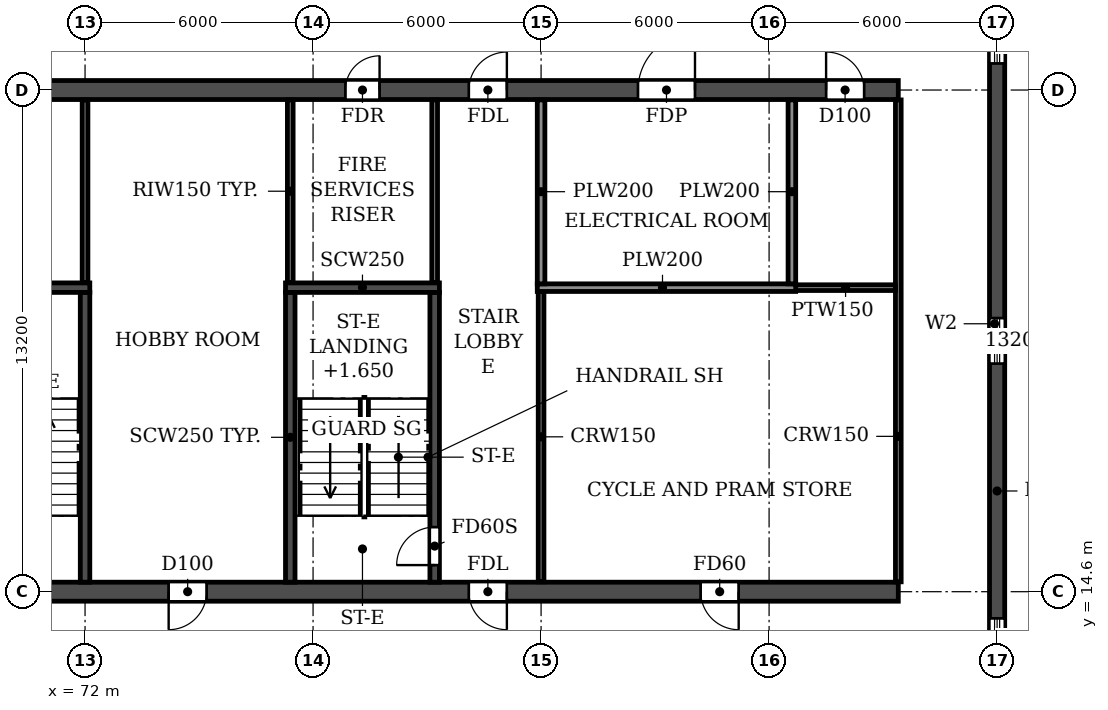
"""IFC4 building model, lengths in metres.
Left out: names, types, materials, properties, quantities, classifications, styles, units other than length and angle.
Written with IfcOpenShell. Run it as: python <this file> out.ifc"""

import sys

from ifc_helpers import new_model, si_unit, direction, frame, frame_2d, origin, place, context, subcontext, project, spatial, rectangle, extrude, element, fill, save


model = new_model("IFC4")
c1 = context("Model", 3, precision=1e-05, world=origin(), true_north=direction((0.0, 1.0)))
c2 = subcontext(c1, "Body", "Model", "MODEL_VIEW")
j1 = project(units=[si_unit("LENGTHUNIT", "METRE"), si_unit("PLANEANGLEUNIT", "RADIAN")], contexts=[c1])
p1 = place(None, origin())
s1 = spatial("IfcSite", under=j1, at=p1, CompositionType="ELEMENT")
p2 = place(p1, origin())
s2 = spatial("IfcBuilding", under=s1, at=p2, CompositionType="ELEMENT")
p3 = place(p2, frame((0.0, 0.0, 102.6)))
s3 = spatial("IfcBuildingStorey", under=s2, at=p3, CompositionType="ELEMENT", Elevation=102.6)
p4 = place(p3, frame((96.0, 4.683, 0.0), z_axis=(0.0, 0.0, 1.0), x_axis=(0.0, 1.0, 0.0)))
e1 = element("IfcWall", 1, at=p4, inside=s3, PredefinedType="SHEAR", context=c2, shape_type="SweptSolid", body=[
    extrude(rectangle(XDim=34.234, YDim=0.4, at=frame_2d((17.117, 0.0))), origin(), (0.0, 0.0, 1.0), 3.0),
])
p5 = place(p4, frame((15.917, 0.0, 0.9)))
e2 = element("IfcOpeningElement", 2, at=p5, cuts=e1, PredefinedType="OPENING", context=c2, shape_type="SweptSolid", body=[
    extrude(rectangle(XDim=1.2, YDim=1.5, at=frame_2d((0.6, 0.75))), frame((0.0, 0.21, 0.0), z_axis=(0.0, -1.0, 0.0), x_axis=(1.0, 0.0, 0.0)), (0.0, 0.0, 1.0), 0.42),
])
p6 = place(p4, frame((23.817, 0.0, 0.9)))
e3 = element("IfcOpeningElement", 3, at=p6, cuts=e1, PredefinedType="OPENING", context=c2, shape_type="SweptSolid", body=[
    extrude(rectangle(XDim=1.2, YDim=1.5, at=frame_2d((0.6, 0.75))), frame((0.0, 0.21, 0.0), z_axis=(0.0, -1.0, 0.0), x_axis=(1.0, 0.0, 0.0)), (0.0, 0.0, 1.0), 0.42),
])
p7 = place(p4, frame((8.017, 0.0, 0.9)))
e4 = element("IfcOpeningElement", 4, at=p7, cuts=e1, PredefinedType="OPENING", context=c2, shape_type="SweptSolid", body=[
    extrude(rectangle(XDim=1.2, YDim=1.5, at=frame_2d((0.6, 0.75))), frame((0.0, 0.21, 0.0), z_axis=(0.0, -1.0, 0.0), x_axis=(1.0, 0.0, 0.0)), (0.0, 0.0, 1.0), 0.42),
])
p8 = place(p4, frame((28.894, 0.0, 0.6)))
e5 = element("IfcOpeningElement", 5, at=p8, cuts=e1, PredefinedType="OPENING", context=c2, shape_type="SweptSolid", body=[
    extrude(rectangle(XDim=2.2, YDim=1.8, at=frame_2d((1.1, 0.9))), frame((0.0, 0.21, 0.0), z_axis=(0.0, -1.0, 0.0), x_axis=(1.0, 0.0, 0.0)), (0.0, 0.0, 1.0), 0.42),
])
p9 = place(p4, frame((2.541, 0.0, 0.6)))
e6 = element("IfcOpeningElement", 6, at=p9, cuts=e1, PredefinedType="OPENING", context=c2, shape_type="SweptSolid", body=[
    extrude(rectangle(XDim=2.2, YDim=1.8, at=frame_2d((1.1, 0.9))), frame((0.0, 0.21, 0.0), z_axis=(0.0, -1.0, 0.0), x_axis=(1.0, 0.0, 0.0)), (0.0, 0.0, 1.0), 0.42),
])
p10 = place(p3, frame((8.6, 14.6, 0.0), z_axis=(0.0, 0.0, 1.0), x_axis=(1.0, 0.0, 0.0)))
e7 = element("IfcWall", 7, at=p10, inside=s3, PredefinedType="SOLIDWALL", context=c2, shape_type="SweptSolid", body=[
    extrude(rectangle(XDim=84.8, YDim=0.5, at=frame_2d((42.4, 0.0))), origin(), (0.0, 0.0, 1.0), 3.0),
])
p11 = place(p10, frame((0.9, 0.0, 0.0)))
e8 = element("IfcOpeningElement", 8, at=p11, cuts=e7, PredefinedType="OPENING", context=c2, shape_type="SweptSolid", body=[
    extrude(rectangle(XDim=1.0, YDim=2.1, at=frame_2d((0.5, 1.05))), frame((0.0, 0.26, 0.0), z_axis=(0.0, -1.0, 0.0), x_axis=(1.0, 0.0, 0.0)), (0.0, 0.0, 1.0), 0.52),
])
p12 = place(p10, frame((5.6, 0.0, 0.0)))
e9 = element("IfcOpeningElement", 9, at=p12, cuts=e7, PredefinedType="OPENING", context=c2, shape_type="SweptSolid", body=[
    extrude(rectangle(XDim=1.0, YDim=2.1, at=frame_2d((0.5, 1.05))), frame((0.0, 0.26, 0.0), z_axis=(0.0, -1.0, 0.0), x_axis=(1.0, 0.0, 0.0)), (0.0, 0.0, 1.0), 0.52),
])
p13 = place(p10, frame((10.3, 0.0, 0.0)))
e10 = element("IfcOpeningElement", 10, at=p13, cuts=e7, PredefinedType="OPENING", context=c2, shape_type="SweptSolid", body=[
    extrude(rectangle(XDim=1.0, YDim=2.1, at=frame_2d((0.5, 1.05))), frame((0.0, 0.26, 0.0), z_axis=(0.0, -1.0, 0.0), x_axis=(1.0, 0.0, 0.0)), (0.0, 0.0, 1.0), 0.52),
])
p14 = place(p10, frame((18.2, 0.0, 0.0)))
e11 = element("IfcOpeningElement", 11, at=p14, cuts=e7, PredefinedType="OPENING", context=c2, shape_type="SweptSolid", body=[
    extrude(rectangle(XDim=1.0, YDim=2.1, at=frame_2d((0.5, 1.05))), frame((0.0, 0.26, 0.0), z_axis=(0.0, -1.0, 0.0), x_axis=(1.0, 0.0, 0.0)), (0.0, 0.0, 1.0), 0.52),
])
p15 = place(p10, frame((22.8, 0.0, 0.0)))
e12 = element("IfcOpeningElement", 12, at=p15, cuts=e7, PredefinedType="OPENING", context=c2, shape_type="SweptSolid", body=[
    extrude(rectangle(XDim=1.0, YDim=2.1, at=frame_2d((0.5, 1.05))), frame((0.0, 0.26, 0.0), z_axis=(0.0, -1.0, 0.0), x_axis=(1.0, 0.0, 0.0)), (0.0, 0.0, 1.0), 0.52),
])
p16 = place(p10, frame((36.7, 0.0, 0.0)))
e13 = element("IfcOpeningElement", 13, at=p16, cuts=e7, PredefinedType="OPENING", context=c2, shape_type="SweptSolid", body=[
    extrude(rectangle(XDim=1.0, YDim=2.1, at=frame_2d((0.5, 1.05))), frame((0.0, 0.26, 0.0), z_axis=(0.0, -1.0, 0.0), x_axis=(1.0, 0.0, 0.0)), (0.0, 0.0, 1.0), 0.52),
])
p17 = place(p10, frame((41.9, 0.0, 0.0)))
e14 = element("IfcOpeningElement", 14, at=p17, cuts=e7, PredefinedType="OPENING", context=c2, shape_type="SweptSolid", body=[
    extrude(rectangle(XDim=1.0, YDim=2.1, at=frame_2d((0.5, 1.05))), frame((0.0, 0.26, 0.0), z_axis=(0.0, -1.0, 0.0), x_axis=(1.0, 0.0, 0.0)), (0.0, 0.0, 1.0), 0.52),
])
p18 = place(p10, frame((47.1, 0.0, 0.0)))
e15 = element("IfcOpeningElement", 15, at=p18, cuts=e7, PredefinedType="OPENING", context=c2, shape_type="SweptSolid", body=[
    extrude(rectangle(XDim=1.0, YDim=2.1, at=frame_2d((0.5, 1.05))), frame((0.0, 0.26, 0.0), z_axis=(0.0, -1.0, 0.0), x_axis=(1.0, 0.0, 0.0)), (0.0, 0.0, 1.0), 0.52),
])
p19 = place(p10, frame((61.0, 0.0, 0.0)))
e16 = element("IfcOpeningElement", 16, at=p19, cuts=e7, PredefinedType="OPENING", context=c2, shape_type="SweptSolid", body=[
    extrude(rectangle(XDim=1.0, YDim=2.1, at=frame_2d((0.5, 1.05))), frame((0.0, 0.26, 0.0), z_axis=(0.0, -1.0, 0.0), x_axis=(1.0, 0.0, 0.0)), (0.0, 0.0, 1.0), 0.52),
])
p20 = place(p10, frame((65.6, 0.0, 0.0)))
e17 = element("IfcOpeningElement", 17, at=p20, cuts=e7, PredefinedType="OPENING", context=c2, shape_type="SweptSolid", body=[
    extrude(rectangle(XDim=1.0, YDim=2.1, at=frame_2d((0.5, 1.05))), frame((0.0, 0.26, 0.0), z_axis=(0.0, -1.0, 0.0), x_axis=(1.0, 0.0, 0.0)), (0.0, 0.0, 1.0), 0.52),
])
p21 = place(p10, frame((73.5, 0.0, 0.0)))
e18 = element("IfcOpeningElement", 18, at=p21, cuts=e7, PredefinedType="OPENING", context=c2, shape_type="SweptSolid", body=[
    extrude(rectangle(XDim=1.0, YDim=2.1, at=frame_2d((0.5, 1.05))), frame((0.0, 0.26, 0.0), z_axis=(0.0, -1.0, 0.0), x_axis=(1.0, 0.0, 0.0)), (0.0, 0.0, 1.0), 0.52),
])
p22 = place(p10, frame((79.6, 0.0, 0.0)))
e19 = element("IfcOpeningElement", 19, at=p22, cuts=e7, PredefinedType="OPENING", context=c2, shape_type="SweptSolid", body=[
    extrude(rectangle(XDim=1.0, YDim=2.1, at=frame_2d((0.5, 1.05))), frame((0.0, 0.26, 0.0), z_axis=(0.0, -1.0, 0.0), x_axis=(1.0, 0.0, 0.0)), (0.0, 0.0, 1.0), 0.52),
])
p23 = place(p3, frame((8.6, 27.8, 0.0), z_axis=(0.0, 0.0, 1.0), x_axis=(1.0, 0.0, 0.0)))
e20 = element("IfcWall", 20, at=p23, inside=s3, PredefinedType="SOLIDWALL", context=c2, shape_type="SweptSolid", body=[
    extrude(rectangle(XDim=84.8, YDim=0.5, at=frame_2d((42.4, 0.0))), origin(), (0.0, 0.0, 1.0), 3.0),
])
p24 = place(p23, frame((1.35, 0.0, 0.0)))
e21 = element("IfcOpeningElement", 21, at=p24, cuts=e20, PredefinedType="OPENING", context=c2, shape_type="SweptSolid", body=[
    extrude(rectangle(XDim=1.0, YDim=2.1, at=frame_2d((0.5, 1.05))), frame((0.0, 0.26, 0.0), z_axis=(0.0, -1.0, 0.0), x_axis=(1.0, 0.0, 0.0)), (0.0, 0.0, 1.0), 0.52),
])
p25 = place(p23, frame((6.05, 0.0, 0.0)))
e22 = element("IfcOpeningElement", 22, at=p25, cuts=e20, PredefinedType="OPENING", context=c2, shape_type="SweptSolid", body=[
    extrude(rectangle(XDim=1.0, YDim=2.1, at=frame_2d((0.5, 1.05))), frame((0.0, 0.26, 0.0), z_axis=(0.0, -1.0, 0.0), x_axis=(1.0, 0.0, 0.0)), (0.0, 0.0, 1.0), 0.52),
])
p26 = place(p23, frame((10.3, 0.0, 0.0)))
e23 = element("IfcOpeningElement", 23, at=p26, cuts=e20, PredefinedType="OPENING", context=c2, shape_type="SweptSolid", body=[
    extrude(rectangle(XDim=1.0, YDim=2.1, at=frame_2d((0.5, 1.05))), frame((0.0, 0.26, 0.0), z_axis=(0.0, -1.0, 0.0), x_axis=(1.0, 0.0, 0.0)), (0.0, 0.0, 1.0), 0.52),
])
p27 = place(p23, frame((13.65, 0.0, 0.0)))
e24 = element("IfcOpeningElement", 24, at=p27, cuts=e20, PredefinedType="OPENING", context=c2, shape_type="SweptSolid", body=[
    extrude(rectangle(XDim=0.9, YDim=2.1, at=frame_2d((0.45, 1.05))), frame((0.0, 0.26, 0.0), z_axis=(0.0, -1.0, 0.0), x_axis=(1.0, 0.0, 0.0)), (0.0, 0.0, 1.0), 0.52),
])
p28 = place(p23, frame((22.85, 0.0, 0.0)))
e25 = element("IfcOpeningElement", 25, at=p28, cuts=e20, PredefinedType="OPENING", context=c2, shape_type="SweptSolid", body=[
    extrude(rectangle(XDim=0.9, YDim=2.1, at=frame_2d((0.45, 1.05))), frame((0.0, 0.26, 0.0), z_axis=(0.0, -1.0, 0.0), x_axis=(1.0, 0.0, 0.0)), (0.0, 0.0, 1.0), 0.52),
])
p29 = place(p23, frame((28.6, 0.0, 0.0)))
e26 = element("IfcOpeningElement", 26, at=p29, cuts=e20, PredefinedType="OPENING", context=c2, shape_type="SweptSolid", body=[
    extrude(rectangle(XDim=1.0, YDim=2.1, at=frame_2d((0.5, 1.05))), frame((0.0, 0.26, 0.0), z_axis=(0.0, -1.0, 0.0), x_axis=(1.0, 0.0, 0.0)), (0.0, 0.0, 1.0), 0.52),
])
p30 = place(p23, frame((33.8, 0.0, 0.0)))
e27 = element("IfcOpeningElement", 27, at=p30, cuts=e20, PredefinedType="OPENING", context=c2, shape_type="SweptSolid", body=[
    extrude(rectangle(XDim=1.0, YDim=2.1, at=frame_2d((0.5, 1.05))), frame((0.0, 0.26, 0.0), z_axis=(0.0, -1.0, 0.0), x_axis=(1.0, 0.0, 0.0)), (0.0, 0.0, 1.0), 0.52),
])
p31 = place(p23, frame((39.0, 0.0, 0.0)))
e28 = element("IfcOpeningElement", 28, at=p31, cuts=e20, PredefinedType="OPENING", context=c2, shape_type="SweptSolid", body=[
    extrude(rectangle(XDim=1.0, YDim=2.1, at=frame_2d((0.5, 1.05))), frame((0.0, 0.26, 0.0), z_axis=(0.0, -1.0, 0.0), x_axis=(1.0, 0.0, 0.0)), (0.0, 0.0, 1.0), 0.52),
])
p32 = place(p23, frame((41.9, 0.0, 0.0)))
e29 = element("IfcOpeningElement", 29, at=p32, cuts=e20, PredefinedType="OPENING", context=c2, shape_type="SweptSolid", body=[
    extrude(rectangle(XDim=1.0, YDim=2.1, at=frame_2d((0.5, 1.05))), frame((0.0, 0.26, 0.0), z_axis=(0.0, -1.0, 0.0), x_axis=(1.0, 0.0, 0.0)), (0.0, 0.0, 1.0), 0.52),
])
p33 = place(p23, frame((44.8, 0.0, 0.0)))
e30 = element("IfcOpeningElement", 30, at=p33, cuts=e20, PredefinedType="OPENING", context=c2, shape_type="SweptSolid", body=[
    extrude(rectangle(XDim=1.0, YDim=2.1, at=frame_2d((0.5, 1.05))), frame((0.0, 0.26, 0.0), z_axis=(0.0, -1.0, 0.0), x_axis=(1.0, 0.0, 0.0)), (0.0, 0.0, 1.0), 0.52),
])
p34 = place(p23, frame((48.7, 0.0, 0.0)))
e31 = element("IfcOpeningElement", 31, at=p34, cuts=e20, PredefinedType="OPENING", context=c2, shape_type="SweptSolid", body=[
    extrude(rectangle(XDim=1.0, YDim=2.1, at=frame_2d((0.5, 1.05))), frame((0.0, 0.26, 0.0), z_axis=(0.0, -1.0, 0.0), x_axis=(1.0, 0.0, 0.0)), (0.0, 0.0, 1.0), 0.52),
])
p35 = place(p23, frame((55.2, 0.0, 0.0)))
e32 = element("IfcOpeningElement", 32, at=p35, cuts=e20, PredefinedType="OPENING", context=c2, shape_type="SweptSolid", body=[
    extrude(rectangle(XDim=1.0, YDim=2.1, at=frame_2d((0.5, 1.05))), frame((0.0, 0.26, 0.0), z_axis=(0.0, -1.0, 0.0), x_axis=(1.0, 0.0, 0.0)), (0.0, 0.0, 1.0), 0.52),
])
p36 = place(p23, frame((61.05, 0.0, 0.0)))
e33 = element("IfcOpeningElement", 33, at=p36, cuts=e20, PredefinedType="OPENING", context=c2, shape_type="SweptSolid", body=[
    extrude(rectangle(XDim=0.9, YDim=2.1, at=frame_2d((0.45, 1.05))), frame((0.0, 0.26, 0.0), z_axis=(0.0, -1.0, 0.0), x_axis=(1.0, 0.0, 0.0)), (0.0, 0.0, 1.0), 0.52),
])
p37 = place(p23, frame((70.25, 0.0, 0.0)))
e34 = element("IfcOpeningElement", 34, at=p37, cuts=e20, PredefinedType="OPENING", context=c2, shape_type="SweptSolid", body=[
    extrude(rectangle(XDim=0.9, YDim=2.1, at=frame_2d((0.45, 1.05))), frame((0.0, 0.26, 0.0), z_axis=(0.0, -1.0, 0.0), x_axis=(1.0, 0.0, 0.0)), (0.0, 0.0, 1.0), 0.52),
])
p38 = place(p23, frame((73.5, 0.0, 0.0)))
e35 = element("IfcOpeningElement", 35, at=p38, cuts=e20, PredefinedType="OPENING", context=c2, shape_type="SweptSolid", body=[
    extrude(rectangle(XDim=1.0, YDim=2.1, at=frame_2d((0.5, 1.05))), frame((0.0, 0.26, 0.0), z_axis=(0.0, -1.0, 0.0), x_axis=(1.0, 0.0, 0.0)), (0.0, 0.0, 1.0), 0.52),
])
p39 = place(p23, frame((77.95, 0.0, 0.0)))
e36 = element("IfcOpeningElement", 36, at=p39, cuts=e20, PredefinedType="OPENING", context=c2, shape_type="SweptSolid", body=[
    extrude(rectangle(XDim=1.5, YDim=2.1, at=frame_2d((0.75, 1.05))), frame((0.0, 0.26, 0.0), z_axis=(0.0, -1.0, 0.0), x_axis=(1.0, 0.0, 0.0)), (0.0, 0.0, 1.0), 0.52),
])
p40 = place(p23, frame((82.9, 0.0, 0.0)))
e37 = element("IfcOpeningElement", 37, at=p40, cuts=e20, PredefinedType="OPENING", context=c2, shape_type="SweptSolid", body=[
    extrude(rectangle(XDim=1.0, YDim=2.1, at=frame_2d((0.5, 1.05))), frame((0.0, 0.26, 0.0), z_axis=(0.0, -1.0, 0.0), x_axis=(1.0, 0.0, 0.0)), (0.0, 0.0, 1.0), 0.52),
])
p41 = place(p3, frame((72.0, 14.85, 0.0), z_axis=(0.0, 0.0, 1.0), x_axis=(0.0, 1.0, 0.0)))
e38 = element("IfcWall", 38, at=p41, inside=s3, PredefinedType="SOLIDWALL", context=c2, shape_type="SweptSolid", body=[
    extrude(rectangle(XDim=7.625, YDim=0.25, at=frame_2d((3.812, 0.0))), origin(), (0.0, 0.0, 1.0), 3.0),
])
p42 = place(p3, frame((68.075, 22.6, 0.0), z_axis=(0.0, 0.0, 1.0), x_axis=(1.0, 0.0, 0.0)))
e39 = element("IfcWall", 39, at=p42, inside=s3, PredefinedType="SOLIDWALL", context=c2, shape_type="SweptSolid", body=[
    extrude(rectangle(XDim=4.05, YDim=0.25, at=frame_2d((2.025, 0.0))), origin(), (0.0, 0.0, 1.0), 3.0),
])
p43 = place(p3, frame((77.4, 14.85, 0.0), z_axis=(0.0, 0.0, 1.0), x_axis=(0.0, 1.0, 0.0)))
e40 = element("IfcWall", 40, at=p43, inside=s3, PredefinedType="SOLIDWALL", context=c2, shape_type="SweptSolid", body=[
    extrude(rectangle(XDim=7.625, YDim=0.25, at=frame_2d((3.812, 0.0))), origin(), (0.0, 0.0, 1.0), 3.0),
])
p44 = place(p3, frame((81.2, 14.85, 0.0), z_axis=(0.0, 0.0, 1.0), x_axis=(0.0, 1.0, 0.0)))
e41 = element("IfcWall", 41, at=p44, inside=s3, PredefinedType="SOLIDWALL", context=c2, shape_type="SweptSolid", body=[
    extrude(rectangle(XDim=7.625, YDim=0.25, at=frame_2d((3.812, 0.0))), origin(), (0.0, 0.0, 1.0), 3.0),
])
p45 = place(p44, frame((0.45, 0.0, 0.0)))
e42 = element("IfcOpeningElement", 42, at=p45, cuts=e41, PredefinedType="OPENING", context=c2, shape_type="SweptSolid", body=[
    extrude(rectangle(XDim=1.0, YDim=2.1, at=frame_2d((0.5, 1.05))), frame((0.0, 0.135, 0.0), z_axis=(0.0, -1.0, 0.0), x_axis=(1.0, 0.0, 0.0)), (0.0, 0.0, 1.0), 0.27),
])
p46 = place(p3, frame((77.275, 22.6, 0.0), z_axis=(0.0, 0.0, 1.0), x_axis=(1.0, 0.0, 0.0)))
e43 = element("IfcWall", 43, at=p46, inside=s3, PredefinedType="SOLIDWALL", context=c2, shape_type="SweptSolid", body=[
    extrude(rectangle(XDim=4.05, YDim=0.25, at=frame_2d((2.025, 0.0))), origin(), (0.0, 0.0, 1.0), 3.0),
])
p47 = place(p3, frame((84.0, 14.86, 0.0), z_axis=(0.0, 0.0, 1.0), x_axis=(0.0, 1.0, 0.0)))
e44 = element("IfcWall", 44, at=p47, inside=s3, PredefinedType="PARTITIONING", context=c2, shape_type="SweptSolid", body=[
    extrude(rectangle(XDim=7.64, YDim=0.15, at=frame_2d((3.82, 0.0))), origin(), (0.0, 0.0, 1.0), 3.0),
])
p48 = place(p3, frame((93.4, 14.86, 0.0), z_axis=(0.0, 0.0, 1.0), x_axis=(0.0, 1.0, 0.0)))
e45 = element("IfcWall", 45, at=p48, inside=s3, PredefinedType="PARTITIONING", context=c2, shape_type="SweptSolid", body=[
    extrude(rectangle(XDim=12.68, YDim=0.15, at=frame_2d((6.34, 0.0))), origin(), (0.0, 0.0, 1.0), 3.0),
])
p49 = place(p3, frame((90.5, 22.6, 0.0), z_axis=(0.0, 0.0, 1.0), x_axis=(1.0, 0.0, 0.0)))
e46 = element("IfcWall", 46, at=p49, inside=s3, PredefinedType="PARTITIONING", context=c2, shape_type="SweptSolid", body=[
    extrude(rectangle(XDim=2.825, YDim=0.15, at=frame_2d((1.413, 0.0))), origin(), (0.0, 0.0, 1.0), 3.0),
])
p50 = place(p3, frame((83.9, 22.6, 0.0), z_axis=(0.0, 0.0, 1.0), x_axis=(1.0, 0.0, 0.0)))
e47 = element("IfcWall", 47, at=p50, inside=s3, PredefinedType="PARTITIONING", context=c2, shape_type="SweptSolid", body=[
    extrude(rectangle(XDim=6.8, YDim=0.2, at=frame_2d((3.4, 0.0))), origin(), (0.0, 0.0, 1.0), 3.0),
])
for number, where, z_axis, x_axis in (
    (48, (84.0, 22.7, 0.0), (0.0, 0.0, 1.0), (0.0, 1.0, 0.0)),
    (49, (90.6, 22.7, 0.0), (0.0, 0.0, 1.0), (0.0, 1.0, 0.0)),
):
    element("IfcWall", number, at=place(p3, frame(where, z_axis=z_axis, x_axis=x_axis)), inside=s3, PredefinedType="PARTITIONING", context=c2, shape_type="SweptSolid", body=[
        extrude(rectangle(XDim=4.84, YDim=0.2, at=frame_2d((2.42, 0.0))), origin(), (0.0, 0.0, 1.0), 3.0),
    ])
for number, where, z_axis, x_axis in (
    (50, (72.0, 22.735, 0.0), (0.0, 0.0, 1.0), (0.0, 1.0, 0.0)),
    (51, (77.4, 22.735, 0.0), (0.0, 0.0, 1.0), (0.0, 1.0, 0.0)),
    (52, (81.2, 22.735, 0.0), (0.0, 0.0, 1.0), (0.0, 1.0, 0.0)),
):
    element("IfcWall", number, at=place(p3, frame(where, z_axis=z_axis, x_axis=x_axis)), inside=s3, PredefinedType="PARTITIONING", context=c2, shape_type="SweptSolid", body=[
        extrude(rectangle(XDim=4.805, YDim=0.15, at=frame_2d((2.402, 0.0))), origin(), (0.0, 0.0, 1.0), 3.0),
    ])
p51 = place(p5, origin())
e53 = element("IfcWindow", 53, at=p51, inside=s3, PartitioningType="SINGLE_PANEL", PredefinedType="WINDOW", context=c2, shape_type="SweptSolid", body=[
    extrude(rectangle(XDim=1.2, YDim=1.5, at=frame_2d((0.6, 0.75))), frame((0.0, 0.03, 0.0), z_axis=(0.0, -1.0, 0.0), x_axis=(1.0, 0.0, 0.0)), (0.0, 0.0, 1.0), 0.06),
])
fill(e2, e53)
p52 = place(p6, origin())
e54 = element("IfcWindow", 54, at=p52, inside=s3, PartitioningType="SINGLE_PANEL", PredefinedType="WINDOW", context=c2, shape_type="SweptSolid", body=[
    extrude(rectangle(XDim=1.2, YDim=1.5, at=frame_2d((0.6, 0.75))), frame((0.0, 0.03, 0.0), z_axis=(0.0, -1.0, 0.0), x_axis=(1.0, 0.0, 0.0)), (0.0, 0.0, 1.0), 0.06),
])
fill(e3, e54)
p53 = place(p7, origin())
e55 = element("IfcWindow", 55, at=p53, inside=s3, PartitioningType="SINGLE_PANEL", PredefinedType="WINDOW", context=c2, shape_type="SweptSolid", body=[
    extrude(rectangle(XDim=1.2, YDim=1.5, at=frame_2d((0.6, 0.75))), frame((0.0, 0.03, 0.0), z_axis=(0.0, -1.0, 0.0), x_axis=(1.0, 0.0, 0.0)), (0.0, 0.0, 1.0), 0.06),
])
fill(e4, e55)
p54 = place(p37, origin())
e56 = element("IfcDoor", 56, at=p54, inside=s3, OperationType="SINGLE_SWING_RIGHT", PredefinedType="DOOR", context=c2, shape_type="SweptSolid", body=[
    extrude(rectangle(XDim=0.9, YDim=2.1, at=frame_2d((0.45, 1.05))), frame((0.0, 0.025, 0.0), z_axis=(0.0, -1.0, 0.0), x_axis=(1.0, 0.0, 0.0)), (0.0, 0.0, 1.0), 0.05),
])
fill(e34, e56)
p55 = place(p38, origin())
e57 = element("IfcDoor", 57, at=p55, inside=s3, OperationType="SINGLE_SWING_RIGHT", PredefinedType="DOOR", context=c2, shape_type="SweptSolid", body=[
    extrude(rectangle(XDim=1.0, YDim=2.1, at=frame_2d((0.5, 1.05))), frame((0.0, 0.025, 0.0), z_axis=(0.0, -1.0, 0.0), x_axis=(1.0, 0.0, 0.0)), (0.0, 0.0, 1.0), 0.05),
])
fill(e35, e57)
p56 = place(p39, origin())
e58 = element("IfcDoor", 58, at=p56, inside=s3, OperationType="DOUBLE_DOOR_SINGLE_SWING", PredefinedType="DOOR", context=c2, shape_type="SweptSolid", body=[
    extrude(rectangle(XDim=1.5, YDim=2.1, at=frame_2d((0.75, 1.05))), frame((0.0, 0.025, 0.0), z_axis=(0.0, -1.0, 0.0), x_axis=(1.0, 0.0, 0.0)), (0.0, 0.0, 1.0), 0.05),
])
fill(e36, e58)
p57 = place(p40, origin())
e59 = element("IfcDoor", 59, at=p57, inside=s3, OperationType="SINGLE_SWING_LEFT", PredefinedType="DOOR", context=c2, shape_type="SweptSolid", body=[
    extrude(rectangle(XDim=1.0, YDim=2.1, at=frame_2d((0.5, 1.05))), frame((0.0, 0.025, 0.0), z_axis=(0.0, -1.0, 0.0), x_axis=(1.0, 0.0, 0.0)), (0.0, 0.0, 1.0), 0.05),
])
fill(e37, e59)
p58 = place(p20, frame((1.0, 0.0, 0.0), z_axis=(0.0, 0.0, 1.0), x_axis=(-1.0, 0.0, 0.0)))
e60 = element("IfcDoor", 60, at=p58, inside=s3, OperationType="SINGLE_SWING_RIGHT", PredefinedType="DOOR", context=c2, shape_type="SweptSolid", body=[
    extrude(rectangle(XDim=1.0, YDim=2.1, at=frame_2d((0.5, 1.05))), frame((0.0, 0.025, 0.0), z_axis=(0.0, -1.0, 0.0), x_axis=(1.0, 0.0, 0.0)), (0.0, 0.0, 1.0), 0.05),
])
fill(e17, e60)
p59 = place(p21, frame((1.0, 0.0, 0.0), z_axis=(0.0, 0.0, 1.0), x_axis=(-1.0, 0.0, 0.0)))
e61 = element("IfcDoor", 61, at=p59, inside=s3, OperationType="SINGLE_SWING_LEFT", PredefinedType="DOOR", context=c2, shape_type="SweptSolid", body=[
    extrude(rectangle(XDim=1.0, YDim=2.1, at=frame_2d((0.5, 1.05))), frame((0.0, 0.025, 0.0), z_axis=(0.0, -1.0, 0.0), x_axis=(1.0, 0.0, 0.0)), (0.0, 0.0, 1.0), 0.05),
])
fill(e18, e61)
p60 = place(p22, frame((1.0, 0.0, 0.0), z_axis=(0.0, 0.0, 1.0), x_axis=(-1.0, 0.0, 0.0)))
e62 = element("IfcDoor", 62, at=p60, inside=s3, OperationType="SINGLE_SWING_LEFT", PredefinedType="DOOR", context=c2, shape_type="SweptSolid", body=[
    extrude(rectangle(XDim=1.0, YDim=2.1, at=frame_2d((0.5, 1.05))), frame((0.0, 0.025, 0.0), z_axis=(0.0, -1.0, 0.0), x_axis=(1.0, 0.0, 0.0)), (0.0, 0.0, 1.0), 0.05),
])
fill(e19, e62)
p61 = place(p45, origin())
e63 = element("IfcDoor", 63, at=p61, inside=s3, OperationType="SINGLE_SWING_LEFT", PredefinedType="DOOR", context=c2, shape_type="SweptSolid", body=[
    extrude(rectangle(XDim=1.0, YDim=2.1, at=frame_2d((0.5, 1.05))), frame((0.0, 0.025, 0.0), z_axis=(0.0, -1.0, 0.0), x_axis=(1.0, 0.0, 0.0)), (0.0, 0.0, 1.0), 0.05),
])
fill(e42, e63)
save(model, sys.argv[1])
